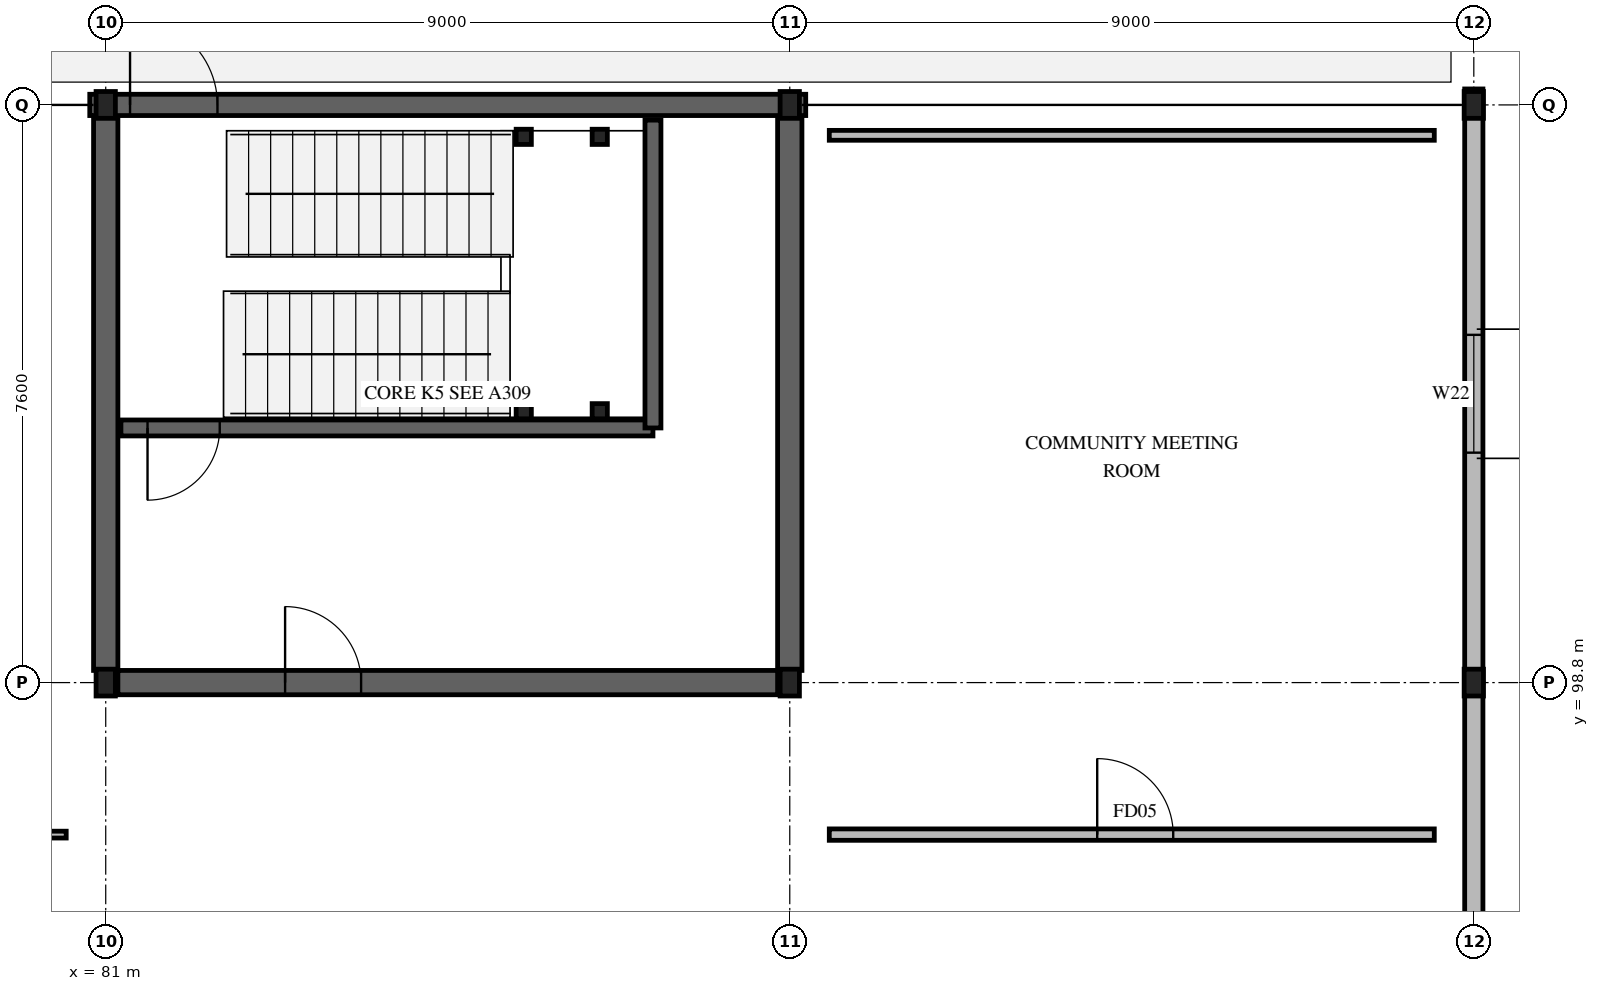
"""IFC4 building model, lengths in metres.
Left out: names, types, materials, properties, quantities, classifications, styles, units other than length and angle.
Written with IfcOpenShell. Run it as: python <this file> out.ifc"""

import sys

from ifc_helpers import new_model, si_unit, direction, frame, frame_2d, origin, origin_2d, place, context, subcontext, project, spatial, rectangle, hollow_rectangle, i_section, extrude, element, fill, save


model = new_model("IFC4")
c1 = context("Model", 3, precision=1e-05, world=origin(), true_north=direction((0.0, 1.0)))
c2 = subcontext(c1, "Body", "Model", "MODEL_VIEW")
j1 = project(units=[si_unit("LENGTHUNIT", "METRE"), si_unit("PLANEANGLEUNIT", "RADIAN")], contexts=[c1])
p1 = place(None, origin())
s1 = spatial("IfcSite", under=j1, at=p1, CompositionType="ELEMENT")
p2 = place(p1, origin())
s2 = spatial("IfcBuilding", under=s1, at=p2, CompositionType="ELEMENT")
p3 = place(p2, origin())
s3 = spatial("IfcBuildingStorey", under=s2, at=p3, CompositionType="ELEMENT", Elevation=0.0)
for number, where, z_axis, x_axis in (
    (1, (81.0, 98.8, 0.0), (0.0, 0.0, 1.0), (1.0, 0.0, 0.0)),
    (2, (81.0, 106.4, 0.0), (0.0, 0.0, 1.0), (1.0, 0.0, 0.0)),
    (3, (90.0, 98.8, 0.0), (0.0, 0.0, 1.0), (1.0, 0.0, 0.0)),
    (4, (90.0, 106.4, 0.0), (0.0, 0.0, 1.0), (1.0, 0.0, 0.0)),
    (5, (99.0, 98.8, 0.0), (0.0, 0.0, 1.0), (1.0, 0.0, 0.0)),
    (6, (99.0, 106.4, 0.0), (0.0, 0.0, 1.0), (1.0, 0.0, 0.0)),
):
    element("IfcColumn", number, at=place(p3, frame(where, z_axis=z_axis, x_axis=x_axis)), inside=s3, PredefinedType="COLUMN", context=c2, shape_type="SweptSolid", body=[
        extrude(i_section(OverallWidth=0.254, OverallDepth=0.353, WebThickness=0.01, FlangeThickness=0.016, FilletRadius=0.015, at=origin_2d()), origin(), (0.0, 0.0, 1.0), 5.04),
    ])
p4 = place(p3, frame((80.79, 106.4, 0.0), z_axis=(0.0, 0.0, 1.0), x_axis=(1.0, 0.0, 0.0)))
e7 = element("IfcWall", 7, at=p4, inside=s3, PredefinedType="SOLIDWALL", context=c2, shape_type="SweptSolid", body=[
    extrude(rectangle(XDim=9.42, YDim=0.28, at=frame_2d((4.71, 0.0))), origin(), (0.0, 0.0, 1.0), 4.8),
])
p5 = place(p4, frame((0.53, 0.0, 0.0)))
e8 = element("IfcOpeningElement", 8, at=p5, cuts=e7, PredefinedType="OPENING", context=c2, shape_type="SweptSolid", body=[
    extrude(rectangle(XDim=1.15, YDim=2.2, at=frame_2d((0.575, 1.1))), frame((0.0, 0.15, 0.0), z_axis=(0.0, -1.0, 0.0), x_axis=(1.0, 0.0, 0.0)), (0.0, 0.0, 1.0), 0.3),
])
p6 = place(p3, frame((99.0, 91.2, 0.0), z_axis=(0.0, 0.0, 1.0), x_axis=(0.0, 1.0, 0.0)))
e9 = element("IfcWall", 9, at=p6, inside=s3, PredefinedType="STANDARD", context=c2, shape_type="SweptSolid", body=[
    extrude(rectangle(XDim=7.6, YDim=0.24, at=frame_2d((3.8, 0.0))), origin(), (0.0, 0.0, 1.0), 4.421),
])
p7 = place(p6, frame((3.175, 0.0, 0.85)))
e10 = element("IfcOpeningElement", 10, at=p7, cuts=e9, PredefinedType="OPENING", context=c2, shape_type="SweptSolid", body=[
    extrude(rectangle(XDim=1.25, YDim=1.5, at=frame_2d((0.625, 0.75))), frame((0.0, 0.13, 0.0), z_axis=(0.0, -1.0, 0.0), x_axis=(1.0, 0.0, 0.0)), (0.0, 0.0, 1.0), 0.26),
])
p8 = place(p3, frame((99.0, 98.8, 0.0), z_axis=(0.0, 0.0, 1.0), x_axis=(0.0, 1.0, 0.0)))
e11 = element("IfcWall", 11, at=p8, inside=s3, PredefinedType="STANDARD", context=c2, shape_type="SweptSolid", body=[
    extrude(rectangle(XDim=7.81, YDim=0.24, at=frame_2d((3.905, 0.0))), origin(), (0.0, 0.0, 1.0), 4.421),
])
p9 = place(p8, frame((3.025, 0.0, 0.85)))
e12 = element("IfcOpeningElement", 12, at=p9, cuts=e11, PredefinedType="OPENING", context=c2, shape_type="SweptSolid", body=[
    extrude(rectangle(XDim=1.55, YDim=1.5, at=frame_2d((0.775, 0.75))), frame((0.0, 0.13, 0.0), z_axis=(0.0, -1.0, 0.0), x_axis=(1.0, 0.0, 0.0)), (0.0, 0.0, 1.0), 0.26),
])
p10 = place(p3, frame((81.16, 98.8, 0.0), z_axis=(0.0, 0.0, 1.0), x_axis=(1.0, 0.0, 0.0)))
e13 = element("IfcWall", 13, at=p10, inside=s3, PredefinedType="SHEAR", context=c2, shape_type="SweptSolid", body=[
    extrude(rectangle(XDim=8.68, YDim=0.32, at=frame_2d((4.34, 0.0))), origin(), (0.0, 0.0, 1.0), 4.76),
])
p11 = place(p10, frame((2.2, 0.0, 0.0)))
e14 = element("IfcOpeningElement", 14, at=p11, cuts=e13, PredefinedType="OPENING", context=c2, shape_type="SweptSolid", body=[
    extrude(rectangle(XDim=1.0, YDim=2.15, at=frame_2d((0.5, 1.075))), frame((0.0, 0.17, 0.0), z_axis=(0.0, -1.0, 0.0), x_axis=(1.0, 0.0, 0.0)), (0.0, 0.0, 1.0), 0.34),
])
for number, where, z_axis, x_axis in (
    (15, (81.0, 98.96, 0.0), (0.0, 0.0, 1.0), (0.0, 1.0, 0.0)),
    (16, (90.0, 98.96, 0.0), (0.0, 0.0, 1.0), (0.0, 1.0, 0.0)),
):
    element("IfcWall", number, at=place(p3, frame(where, z_axis=z_axis, x_axis=x_axis)), inside=s3, PredefinedType="SHEAR", context=c2, shape_type="SweptSolid", body=[
        extrude(rectangle(XDim=7.28, YDim=0.32, at=frame_2d((3.64, 0.0))), origin(), (0.0, 0.0, 1.0), 4.76),
    ])
p12 = place(p3, frame((81.2, 102.15, 0.0), z_axis=(0.0, 0.0, 1.0), x_axis=(1.0, 0.0, 0.0)))
e17 = element("IfcWall", 17, at=p12, inside=s3, PredefinedType="SOLIDWALL", context=c2, shape_type="SweptSolid", body=[
    extrude(rectangle(XDim=7.0, YDim=0.21, at=frame_2d((3.5, 0.0))), origin(), (0.0, 0.0, 1.0), 4.76),
])
p13 = place(p12, frame((0.35, 0.0, 0.0)))
e18 = element("IfcOpeningElement", 18, at=p13, cuts=e17, PredefinedType="OPENING", context=c2, shape_type="SweptSolid", body=[
    extrude(rectangle(XDim=0.95, YDim=2.12, at=frame_2d((0.475, 1.06))), frame((0.0, 0.115, 0.0), z_axis=(0.0, -1.0, 0.0), x_axis=(1.0, 0.0, 0.0)), (0.0, 0.0, 1.0), 0.23),
])
p14 = place(p3, frame((88.2, 102.15, 0.0), z_axis=(0.0, 0.0, 1.0), x_axis=(0.0, 1.0, 0.0)))
e19 = element("IfcWall", 19, at=p14, inside=s3, PredefinedType="SOLIDWALL", context=c2, shape_type="SweptSolid", body=[
    extrude(rectangle(XDim=4.05, YDim=0.21, at=frame_2d((2.025, 0.0))), origin(), (0.0, 0.0, 1.0), 4.76),
])
for number, where, z_axis, x_axis in (
    (20, (86.5, 102.37, 0.0), (0.0, 0.0, 1.0), (1.0, 0.0, 0.0)),
    (21, (86.5, 105.98, 0.0), (0.0, 0.0, 1.0), (1.0, 0.0, 0.0)),
    (22, (87.5, 102.37, 0.0), (0.0, 0.0, 1.0), (1.0, 0.0, 0.0)),
    (23, (87.5, 105.98, 0.0), (0.0, 0.0, 1.0), (1.0, 0.0, 0.0)),
):
    element("IfcColumn", number, at=place(p3, frame(where, z_axis=z_axis, x_axis=x_axis)), inside=s3, PredefinedType="COLUMN", context=c2, shape_type="SweptSolid", body=[
        extrude(hollow_rectangle(XDim=0.2, YDim=0.2, WallThickness=0.012, at=origin_2d()), origin(), (0.0, 0.0, 1.0), 5.04),
    ])
p15 = place(p3, frame((54.52, 96.8, 0.0), z_axis=(0.0, 0.0, 1.0), x_axis=(1.0, 0.0, 0.0)))
e24 = element("IfcWall", 24, at=p15, inside=s3, PredefinedType="PARTITIONING", context=c2, shape_type="SweptSolid", body=[
    extrude(rectangle(XDim=25.96, YDim=0.09, at=frame_2d((12.98, 0.0))), origin(), (0.0, 0.0, 1.0), 4.76),
])
p16 = place(p15, frame((11.905, 0.0, 0.0)))
e25 = element("IfcOpeningElement", 25, at=p16, cuts=e24, PredefinedType="OPENING", context=c2, shape_type="SweptSolid", body=[
    extrude(rectangle(XDim=2.15, YDim=2.15, at=frame_2d((1.075, 1.075))), frame((0.0, 0.055, 0.0), z_axis=(0.0, -1.0, 0.0), x_axis=(1.0, 0.0, 0.0)), (0.0, 0.0, 1.0), 0.11),
])
p17 = place(p3, frame((90.52, 96.8, 0.0), z_axis=(0.0, 0.0, 1.0), x_axis=(1.0, 0.0, 0.0)))
e26 = element("IfcWall", 26, at=p17, inside=s3, PredefinedType="PARTITIONING", context=c2, shape_type="SweptSolid", body=[
    extrude(rectangle(XDim=7.96, YDim=0.15, at=frame_2d((3.98, 0.0))), origin(), (0.0, 0.0, 1.0), 4.76),
])
p18 = place(p17, frame((3.525, 0.0, 0.0)))
e27 = element("IfcOpeningElement", 27, at=p18, cuts=e26, PredefinedType="OPENING", context=c2, shape_type="SweptSolid", body=[
    extrude(rectangle(XDim=1.0, YDim=2.15, at=frame_2d((0.5, 1.075))), frame((0.0, 0.085, 0.0), z_axis=(0.0, -1.0, 0.0), x_axis=(1.0, 0.0, 0.0)), (0.0, 0.0, 1.0), 0.17),
])
p19 = place(p3, frame((90.52, 106.0, 0.0), z_axis=(0.0, 0.0, 1.0), x_axis=(1.0, 0.0, 0.0)))
e28 = element("IfcWall", 28, at=p19, inside=s3, PredefinedType="PARTITIONING", context=c2, shape_type="SweptSolid", body=[
    extrude(rectangle(XDim=7.96, YDim=0.13, at=frame_2d((3.98, 0.0))), origin(), (0.0, 0.0, 1.0), 4.76),
])
p20 = place(p5, origin())
e29 = element("IfcDoor", 29, at=p20, inside=s3, OperationType="SINGLE_SWING_LEFT", PredefinedType="DOOR", context=c2, shape_type="SweptSolid", body=[
    extrude(rectangle(XDim=1.15, YDim=2.2, at=frame_2d((0.575, 1.1))), frame((0.0, 0.025, 0.0), z_axis=(0.0, -1.0, 0.0), x_axis=(1.0, 0.0, 0.0)), (0.0, 0.0, 1.0), 0.05),
])
fill(e8, e29)
p21 = place(p9, origin())
e30 = element("IfcWindow", 30, at=p21, inside=s3, PartitioningType="SINGLE_PANEL", PredefinedType="WINDOW", context=c2, shape_type="SweptSolid", body=[
    extrude(rectangle(XDim=1.55, YDim=1.5, at=frame_2d((0.775, 0.75))), frame((0.0, 0.03, 0.0), z_axis=(0.0, -1.0, 0.0), x_axis=(1.0, 0.0, 0.0)), (0.0, 0.0, 1.0), 0.06),
])
fill(e12, e30)
p22 = place(p13, origin())
e31 = element("IfcDoor", 31, at=p22, inside=s3, OperationType="SINGLE_SWING_RIGHT", PredefinedType="DOOR", context=c2, shape_type="SweptSolid", body=[
    extrude(rectangle(XDim=0.95, YDim=2.12, at=frame_2d((0.475, 1.06))), frame((0.0, 0.025, 0.0), z_axis=(0.0, -1.0, 0.0), x_axis=(1.0, 0.0, 0.0)), (0.0, 0.0, 1.0), 0.05),
])
fill(e18, e31)
p23 = place(p11, origin())
e32 = element("IfcDoor", 32, at=p23, inside=s3, OperationType="SINGLE_SWING_LEFT", PredefinedType="DOOR", context=c2, shape_type="SweptSolid", body=[
    extrude(rectangle(XDim=1.0, YDim=2.15, at=frame_2d((0.5, 1.075))), frame((0.0, 0.025, 0.0), z_axis=(0.0, -1.0, 0.0), x_axis=(1.0, 0.0, 0.0)), (0.0, 0.0, 1.0), 0.05),
])
fill(e14, e32)
p24 = place(p18, origin())
e33 = element("IfcDoor", 33, at=p24, inside=s3, OperationType="SINGLE_SWING_LEFT", PredefinedType="DOOR", context=c2, shape_type="SweptSolid", body=[
    extrude(rectangle(XDim=1.0, YDim=2.15, at=frame_2d((0.5, 1.075))), frame((0.0, 0.025, 0.0), z_axis=(0.0, -1.0, 0.0), x_axis=(1.0, 0.0, 0.0)), (0.0, 0.0, 1.0), 0.05),
])
fill(e27, e33)
save(model, sys.argv[1])
